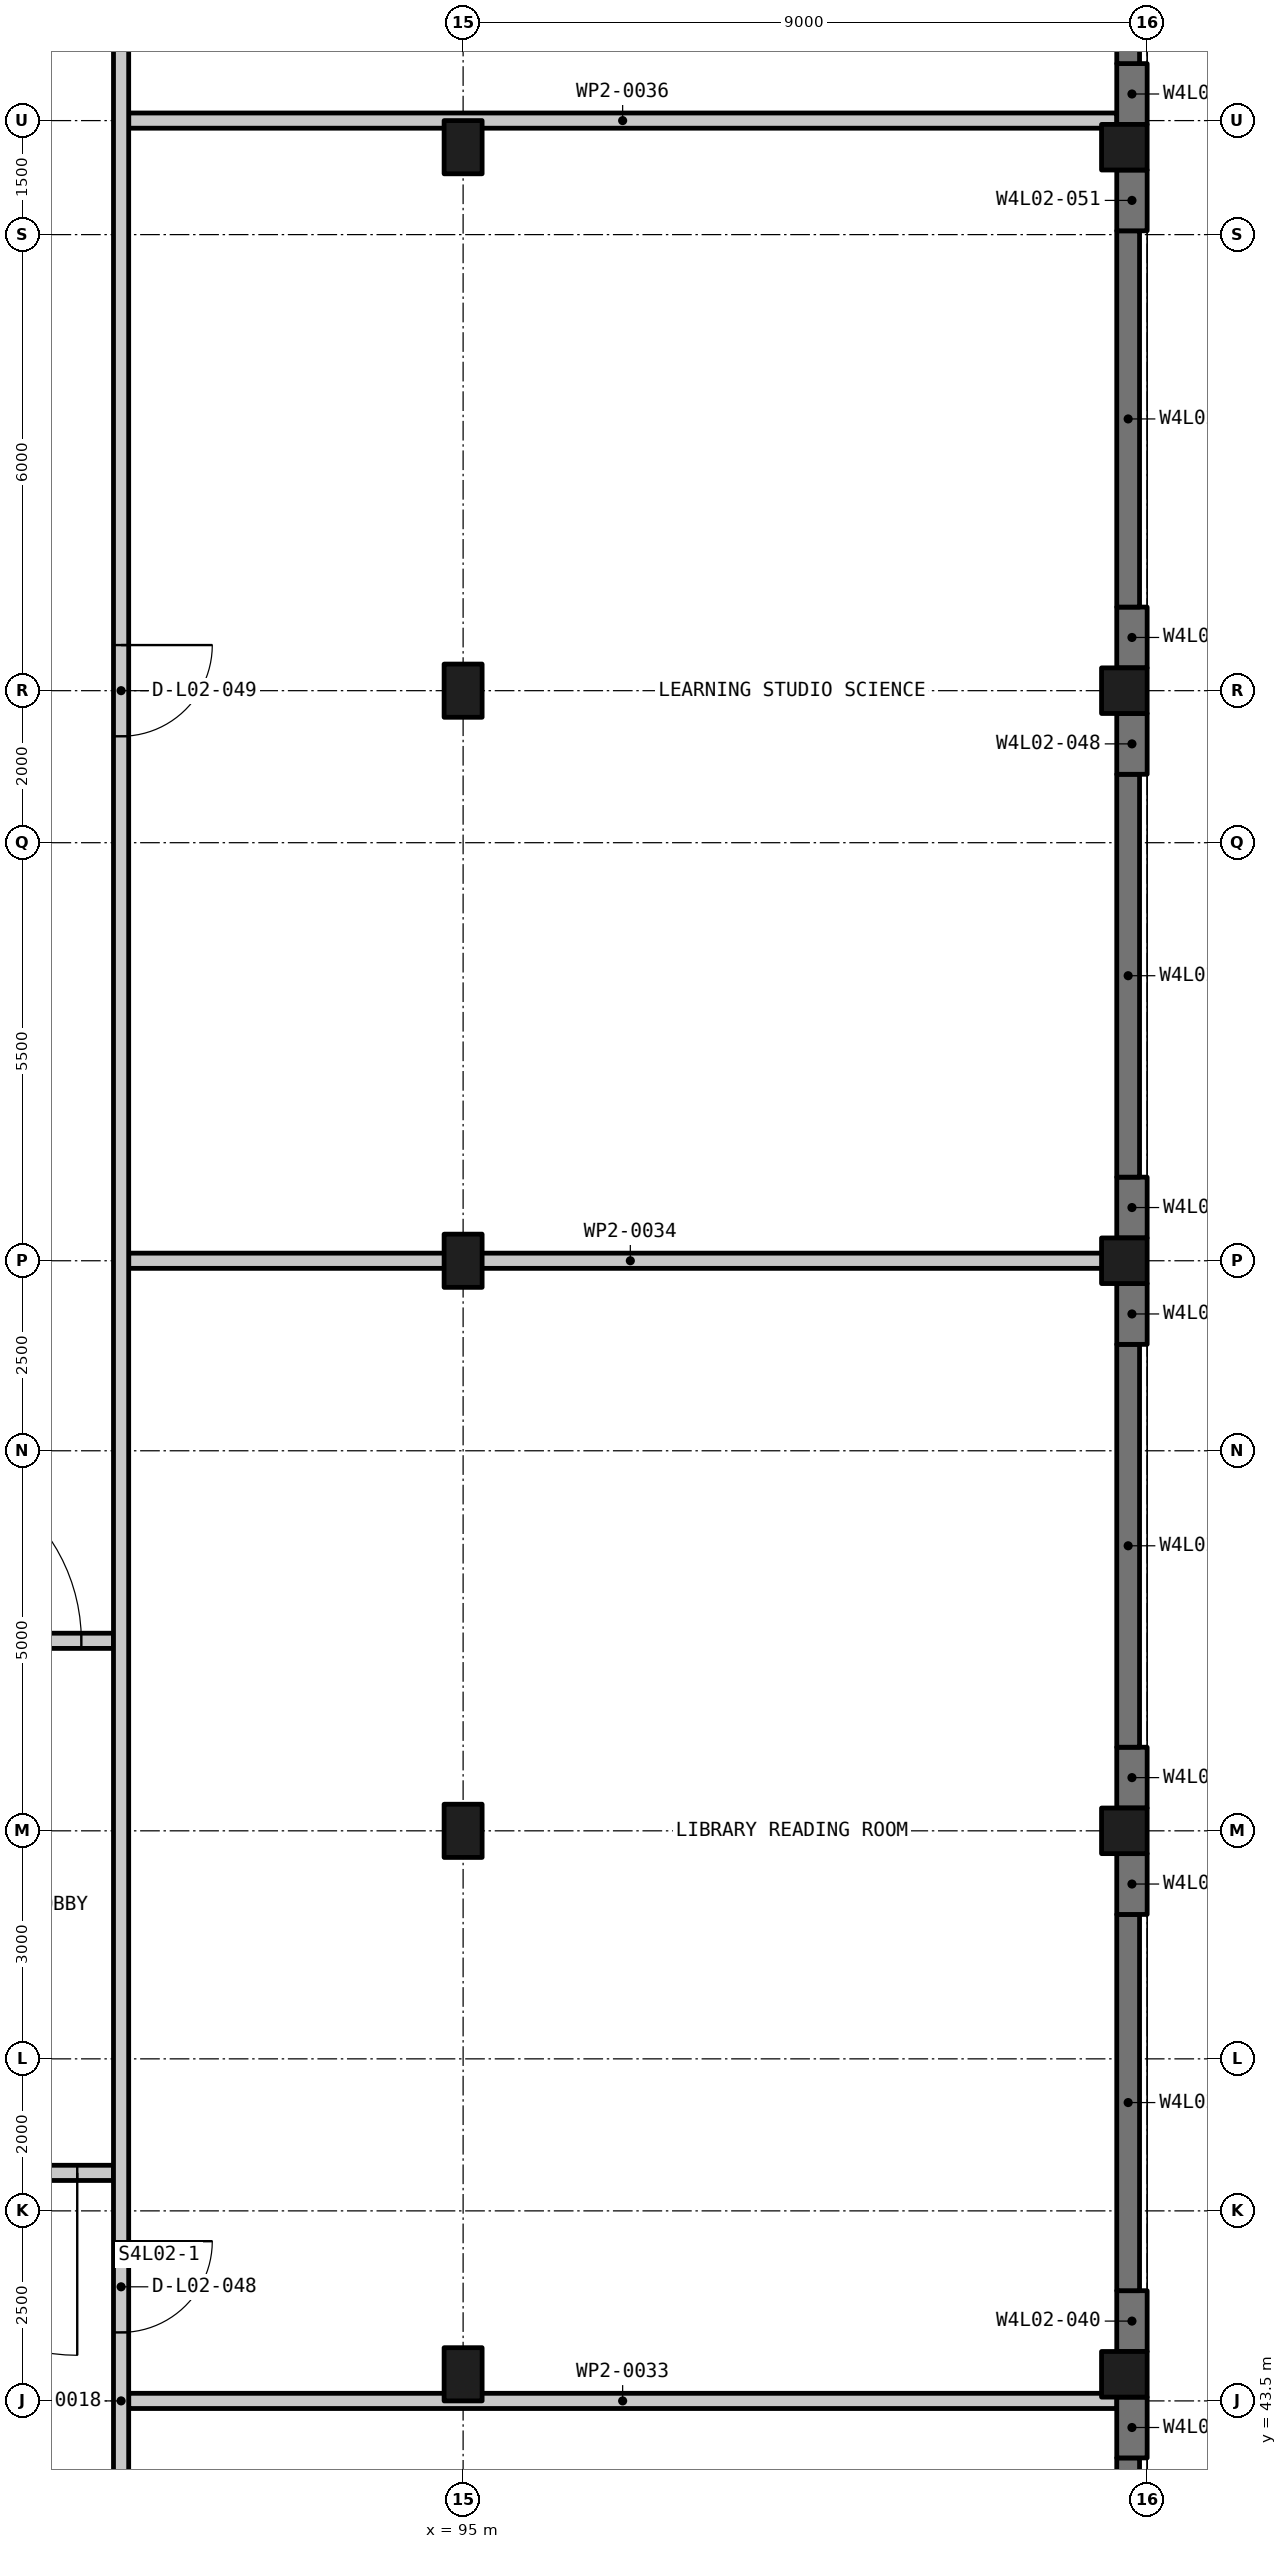
"""IFC4 building model, lengths in metres.
Left out: names, types, materials, properties, quantities, classifications, styles, units other than length and angle.
Written with IfcOpenShell. Run it as: python <this file> out.ifc"""

import sys

from ifc_helpers import new_model, si_unit, direction, frame, frame_2d, origin, origin_2d, place, context, subcontext, project, spatial, rectangle, extrude, element, fill, save


model = new_model("IFC4")
c1 = context("Model", 3, precision=1e-05, world=origin(), true_north=direction((0.0, 1.0)))
c2 = subcontext(c1, "Body", "Model", "MODEL_VIEW")
j1 = project(units=[si_unit("LENGTHUNIT", "METRE"), si_unit("PLANEANGLEUNIT", "RADIAN")], contexts=[c1])
p1 = place(None, origin())
s1 = spatial("IfcSite", under=j1, at=p1, CompositionType="ELEMENT")
p2 = place(p1, origin())
s2 = spatial("IfcBuilding", under=s1, at=p2, CompositionType="ELEMENT")
p3 = place(p2, frame((0.0, 0.0, 11.25)))
s3 = spatial("IfcBuildingStorey", under=s2, at=p3, CompositionType="ELEMENT", Elevation=11.25)
for number, where, z_axis, x_axis in (
    (1, (95.0, 43.85, -0.3), (0.0, 0.0, 1.0), (1.0, 0.0, 0.0)),
    (2, (95.0, 51.0, -0.3), (0.0, 0.0, 1.0), (1.0, 0.0, 0.0)),
    (3, (95.0, 58.5, -0.3), (0.0, 0.0, 1.0), (1.0, 0.0, 0.0)),
    (4, (95.0, 66.0, -0.3), (0.0, 0.0, 1.0), (1.0, 0.0, 0.0)),
    (5, (95.0, 73.15, -0.3), (0.0, 0.0, 1.0), (1.0, 0.0, 0.0)),
):
    element("IfcColumn", number, at=place(p3, frame(where, z_axis=z_axis, x_axis=x_axis)), inside=s3, PredefinedType="COLUMN", context=c2, shape_type="SweptSolid", body=[
        extrude(rectangle(XDim=0.5, YDim=0.7, at=origin_2d()), origin(), (0.0, 0.0, 1.0), 4.5),
    ])
for number, where, z_axis, x_axis in (
    (6, (103.7, 43.85, -0.3), (0.0, 0.0, 1.0), (1.0, 0.0, 0.0)),
    (7, (103.7, 51.0, -0.3), (0.0, 0.0, 1.0), (1.0, 0.0, 0.0)),
    (8, (103.7, 58.5, -0.3), (0.0, 0.0, 1.0), (1.0, 0.0, 0.0)),
    (9, (103.7, 66.0, -0.3), (0.0, 0.0, 1.0), (1.0, 0.0, 0.0)),
    (10, (103.7, 73.15, -0.3), (0.0, 0.0, 1.0), (1.0, 0.0, 0.0)),
):
    element("IfcColumn", number, at=place(p3, frame(where, z_axis=z_axis, x_axis=x_axis)), inside=s3, PredefinedType="COLUMN", context=c2, shape_type="SweptSolid", body=[
        extrude(rectangle(XDim=0.6, YDim=0.6, at=origin_2d()), origin(), (0.0, 0.0, 1.0), 4.5),
    ])
p4 = place(p3, frame((103.75, 37.1, -0.3), z_axis=(0.0, 0.0, 1.0), x_axis=(0.0, 1.0, 0.0)))
e11 = element("IfcWall", 11, at=p4, inside=s3, PredefinedType="SOLIDWALL", context=c2, shape_type="SweptSolid", body=[
    extrude(rectangle(XDim=5.65, YDim=0.3, at=frame_2d((2.825, 0.0))), origin(), (0.0, 0.0, 1.0), 4.5),
])
for number, where, z_axis, x_axis in (
    (12, (103.8, 42.75, -0.3), (0.0, 0.0, 1.0), (0.0, 1.0, 0.0)),
    (13, (103.8, 44.15, -0.3), (0.0, 0.0, 1.0), (0.0, 1.0, 0.0)),
):
    element("IfcWall", number, at=place(p3, frame(where, z_axis=z_axis, x_axis=x_axis)), inside=s3, PredefinedType="SOLIDWALL", context=c2, shape_type="SweptSolid", body=[
        extrude(rectangle(XDim=0.8, YDim=0.4, at=frame_2d((0.4, 0.0))), origin(), (0.0, 0.0, 1.0), 4.5),
    ])
p5 = place(p3, frame((103.75, 44.95, -0.3), z_axis=(0.0, 0.0, 1.0), x_axis=(0.0, 1.0, 0.0)))
e14 = element("IfcWall", 14, at=p5, inside=s3, PredefinedType="SOLIDWALL", context=c2, shape_type="SweptSolid", body=[
    extrude(rectangle(XDim=4.95, YDim=0.3, at=frame_2d((2.475, 0.0))), origin(), (0.0, 0.0, 1.0), 4.5),
])
for number, where, z_axis, x_axis in (
    (15, (103.8, 49.9, -0.3), (0.0, 0.0, 1.0), (0.0, 1.0, 0.0)),
    (16, (103.8, 51.3, -0.3), (0.0, 0.0, 1.0), (0.0, 1.0, 0.0)),
):
    element("IfcWall", number, at=place(p3, frame(where, z_axis=z_axis, x_axis=x_axis)), inside=s3, PredefinedType="SOLIDWALL", context=c2, shape_type="SweptSolid", body=[
        extrude(rectangle(XDim=0.8, YDim=0.4, at=frame_2d((0.4, 0.0))), origin(), (0.0, 0.0, 1.0), 4.5),
    ])
p6 = place(p3, frame((103.75, 52.1, -0.3), z_axis=(0.0, 0.0, 1.0), x_axis=(0.0, 1.0, 0.0)))
e17 = element("IfcWall", 17, at=p6, inside=s3, PredefinedType="SOLIDWALL", context=c2, shape_type="SweptSolid", body=[
    extrude(rectangle(XDim=5.3, YDim=0.3, at=frame_2d((2.65, 0.0))), origin(), (0.0, 0.0, 1.0), 4.5),
])
for number, where, z_axis, x_axis in (
    (18, (103.8, 57.4, -0.3), (0.0, 0.0, 1.0), (0.0, 1.0, 0.0)),
    (19, (103.8, 58.8, -0.3), (0.0, 0.0, 1.0), (0.0, 1.0, 0.0)),
):
    element("IfcWall", number, at=place(p3, frame(where, z_axis=z_axis, x_axis=x_axis)), inside=s3, PredefinedType="SOLIDWALL", context=c2, shape_type="SweptSolid", body=[
        extrude(rectangle(XDim=0.8, YDim=0.4, at=frame_2d((0.4, 0.0))), origin(), (0.0, 0.0, 1.0), 4.5),
    ])
p7 = place(p3, frame((103.75, 59.6, -0.3), z_axis=(0.0, 0.0, 1.0), x_axis=(0.0, 1.0, 0.0)))
e20 = element("IfcWall", 20, at=p7, inside=s3, PredefinedType="SOLIDWALL", context=c2, shape_type="SweptSolid", body=[
    extrude(rectangle(XDim=5.3, YDim=0.3, at=frame_2d((2.65, 0.0))), origin(), (0.0, 0.0, 1.0), 4.5),
])
for number, where, z_axis, x_axis in (
    (21, (103.8, 64.9, -0.3), (0.0, 0.0, 1.0), (0.0, 1.0, 0.0)),
    (22, (103.8, 66.3, -0.3), (0.0, 0.0, 1.0), (0.0, 1.0, 0.0)),
):
    element("IfcWall", number, at=place(p3, frame(where, z_axis=z_axis, x_axis=x_axis)), inside=s3, PredefinedType="SOLIDWALL", context=c2, shape_type="SweptSolid", body=[
        extrude(rectangle(XDim=0.8, YDim=0.4, at=frame_2d((0.4, 0.0))), origin(), (0.0, 0.0, 1.0), 4.5),
    ])
p8 = place(p3, frame((103.75, 67.1, -0.3), z_axis=(0.0, 0.0, 1.0), x_axis=(0.0, 1.0, 0.0)))
e23 = element("IfcWall", 23, at=p8, inside=s3, PredefinedType="SOLIDWALL", context=c2, shape_type="SweptSolid", body=[
    extrude(rectangle(XDim=4.95, YDim=0.3, at=frame_2d((2.475, 0.0))), origin(), (0.0, 0.0, 1.0), 4.5),
])
for number, where, z_axis, x_axis in (
    (24, (103.8, 72.05, -0.3), (0.0, 0.0, 1.0), (0.0, 1.0, 0.0)),
    (25, (103.8, 73.45, -0.3), (0.0, 0.0, 1.0), (0.0, 1.0, 0.0)),
):
    element("IfcWall", number, at=place(p3, frame(where, z_axis=z_axis, x_axis=x_axis)), inside=s3, PredefinedType="SOLIDWALL", context=c2, shape_type="SweptSolid", body=[
        extrude(rectangle(XDim=0.8, YDim=0.4, at=frame_2d((0.4, 0.0))), origin(), (0.0, 0.0, 1.0), 4.5),
    ])
p9 = place(p3, frame((103.75, 74.25, -0.3), z_axis=(0.0, 0.0, 1.0), x_axis=(0.0, 1.0, 0.0)))
e26 = element("IfcWall", 26, at=p9, inside=s3, PredefinedType="SOLIDWALL", context=c2, shape_type="SweptSolid", body=[
    extrude(rectangle(XDim=5.3, YDim=0.3, at=frame_2d((2.65, 0.0))), origin(), (0.0, 0.0, 1.0), 4.5),
])
p10 = place(p3, frame((90.6, 43.5, 0.0), z_axis=(0.0, 0.0, 1.0), x_axis=(1.0, 0.0, 0.0)))
e27 = element("IfcWall", 27, at=p10, inside=s3, PredefinedType="PARTITIONING", context=c2, shape_type="SweptSolid", body=[
    extrude(rectangle(XDim=12.998, YDim=0.2, at=frame_2d((6.499, 0.0))), origin(), (0.0, 0.0, 1.0), 3.4),
])
p11 = place(p3, frame((90.4, 46.5, 0.0), z_axis=(0.0, 0.0, 1.0), x_axis=(-1.0, 0.0, 0.0)))
e28 = element("IfcWall", 28, at=p11, inside=s3, PredefinedType="PARTITIONING", context=c2, shape_type="SweptSolid", body=[
    extrude(rectangle(XDim=3.3, YDim=0.2, at=frame_2d((1.65, 0.0))), origin(), (0.0, 0.0, 1.0), 3.4),
])
p12 = place(p11, frame((0.477, 0.0, 0.0)))
e29 = element("IfcOpeningElement", 29, at=p12, cuts=e28, PredefinedType="OPENING", context=c2, shape_type="SweptSolid", body=[
    extrude(rectangle(XDim=2.4, YDim=2.1, at=frame_2d((1.2, 1.05))), frame((0.0, 0.11, 0.0), z_axis=(0.0, -1.0, 0.0), x_axis=(1.0, 0.0, 0.0)), (0.0, 0.0, 1.0), 0.22),
])
p13 = place(p3, frame((87.1, 53.5, 0.0), z_axis=(0.0, 0.0, 1.0), x_axis=(1.0, 0.0, 0.0)))
e30 = element("IfcWall", 30, at=p13, inside=s3, PredefinedType="PARTITIONING", context=c2, shape_type="SweptSolid", body=[
    extrude(rectangle(XDim=3.3, YDim=0.2, at=frame_2d((1.65, 0.0))), origin(), (0.0, 0.0, 1.0), 3.4),
])
p14 = place(p13, frame((0.477, 0.0, 0.0)))
e31 = element("IfcOpeningElement", 31, at=p14, cuts=e30, PredefinedType="OPENING", context=c2, shape_type="SweptSolid", body=[
    extrude(rectangle(XDim=2.4, YDim=2.1, at=frame_2d((1.2, 1.05))), frame((0.0, 0.11, 0.0), z_axis=(0.0, -1.0, 0.0), x_axis=(1.0, 0.0, 0.0)), (0.0, 0.0, 1.0), 0.22),
])
p15 = place(p3, frame((90.6, 58.5, 0.0), z_axis=(0.0, 0.0, 1.0), x_axis=(1.0, 0.0, 0.0)))
e32 = element("IfcWall", 32, at=p15, inside=s3, PredefinedType="PARTITIONING", context=c2, shape_type="SweptSolid", body=[
    extrude(rectangle(XDim=13.2, YDim=0.2, at=frame_2d((6.6, 0.0))), origin(), (0.0, 0.0, 1.0), 3.3),
])
p16 = place(p3, frame((90.6, 73.5, 0.0), z_axis=(0.0, 0.0, 1.0), x_axis=(1.0, 0.0, 0.0)))
e33 = element("IfcWall", 33, at=p16, inside=s3, PredefinedType="PARTITIONING", context=c2, shape_type="SweptSolid", body=[
    extrude(rectangle(XDim=12.998, YDim=0.2, at=frame_2d((6.499, 0.0))), origin(), (0.0, 0.0, 1.0), 3.4),
])
p17 = place(p3, frame((90.5, 80.8, 0.0), z_axis=(0.0, 0.0, 1.0), x_axis=(0.0, -1.0, 0.0)))
e34 = element("IfcWall", 34, at=p17, inside=s3, PredefinedType="PARTITIONING", context=c2, shape_type="SweptSolid", body=[
    extrude(rectangle(XDim=74.6, YDim=0.2, at=frame_2d((37.3, 0.0))), origin(), (0.0, 0.0, 1.0), 3.3),
])
p18 = place(p17, frame((66.6, 0.0, 0.0)))
e35 = element("IfcOpeningElement", 35, at=p18, cuts=e34, PredefinedType="OPENING", context=c2, shape_type="SweptSolid", body=[
    extrude(rectangle(XDim=1.2, YDim=2.1, at=frame_2d((0.6, 1.05))), frame((0.0, 0.11, 0.0), z_axis=(0.0, -1.0, 0.0), x_axis=(1.0, 0.0, 0.0)), (0.0, 0.0, 1.0), 0.22),
])
p19 = place(p17, frame((55.45, 0.0, 0.0)))
e36 = element("IfcOpeningElement", 36, at=p19, cuts=e34, PredefinedType="OPENING", context=c2, shape_type="SweptSolid", body=[
    extrude(rectangle(XDim=1.2, YDim=2.1, at=frame_2d((0.6, 1.05))), frame((0.0, 0.11, 0.0), z_axis=(0.0, -1.0, 0.0), x_axis=(1.0, 0.0, 0.0)), (0.0, 0.0, 1.0), 0.22),
])
p20 = place(p17, frame((44.2, 0.0, 0.0)))
e37 = element("IfcOpeningElement", 37, at=p20, cuts=e34, PredefinedType="OPENING", context=c2, shape_type="SweptSolid", body=[
    extrude(rectangle(XDim=1.2, YDim=2.1, at=frame_2d((0.6, 1.05))), frame((0.0, 0.11, 0.0), z_axis=(0.0, -1.0, 0.0), x_axis=(1.0, 0.0, 0.0)), (0.0, 0.0, 1.0), 0.22),
])
p21 = place(p17, frame((35.199, 0.0, 0.0)))
e38 = element("IfcOpeningElement", 38, at=p21, cuts=e34, PredefinedType="OPENING", context=c2, shape_type="SweptSolid", body=[
    extrude(rectangle(XDim=1.2, YDim=2.1, at=frame_2d((0.6, 1.05))), frame((0.0, 0.11, 0.0), z_axis=(0.0, -1.0, 0.0), x_axis=(1.0, 0.0, 0.0)), (0.0, 0.0, 1.0), 0.22),
])
p22 = place(p17, frame((14.2, 0.0, 0.0)))
e39 = element("IfcOpeningElement", 39, at=p22, cuts=e34, PredefinedType="OPENING", context=c2, shape_type="SweptSolid", body=[
    extrude(rectangle(XDim=1.2, YDim=2.1, at=frame_2d((0.6, 1.05))), frame((0.0, 0.11, 0.0), z_axis=(0.0, -1.0, 0.0), x_axis=(1.0, 0.0, 0.0)), (0.0, 0.0, 1.0), 0.22),
])
p23 = place(p17, frame((3.075, 0.0, 0.0)))
e40 = element("IfcOpeningElement", 40, at=p23, cuts=e34, PredefinedType="OPENING", context=c2, shape_type="SweptSolid", body=[
    extrude(rectangle(XDim=1.2, YDim=2.1, at=frame_2d((0.6, 1.05))), frame((0.0, 0.11, 0.0), z_axis=(0.0, -1.0, 0.0), x_axis=(1.0, 0.0, 0.0)), (0.0, 0.0, 1.0), 0.22),
])
p24 = place(p14, origin())
e41 = element("IfcDoor", 41, at=p24, inside=s3, OperationType="DOUBLE_DOOR_SINGLE_SWING", PredefinedType="DOOR", context=c2, shape_type="SweptSolid", body=[
    extrude(rectangle(XDim=2.4, YDim=2.1, at=frame_2d((1.2, 1.05))), frame((0.0, 0.025, 0.0), z_axis=(0.0, -1.0, 0.0), x_axis=(1.0, 0.0, 0.0)), (0.0, 0.0, 1.0), 0.05),
])
fill(e31, e41)
p25 = place(p12, origin())
e42 = element("IfcDoor", 42, at=p25, inside=s3, OperationType="DOUBLE_DOOR_SINGLE_SWING", PredefinedType="DOOR", context=c2, shape_type="SweptSolid", body=[
    extrude(rectangle(XDim=2.4, YDim=2.1, at=frame_2d((1.2, 1.05))), frame((0.0, 0.025, 0.0), z_axis=(0.0, -1.0, 0.0), x_axis=(1.0, 0.0, 0.0)), (0.0, 0.0, 1.0), 0.05),
])
fill(e29, e42)
p26 = place(p21, origin())
e43 = element("IfcDoor", 43, at=p26, inside=s3, OperationType="SINGLE_SWING_RIGHT", PredefinedType="DOOR", context=c2, shape_type="SweptSolid", body=[
    extrude(rectangle(XDim=1.2, YDim=2.1, at=frame_2d((0.6, 1.05))), frame((0.0, 0.025, 0.0), z_axis=(0.0, -1.0, 0.0), x_axis=(1.0, 0.0, 0.0)), (0.0, 0.0, 1.0), 0.05),
])
fill(e38, e43)
p27 = place(p22, origin())
e44 = element("IfcDoor", 44, at=p27, inside=s3, OperationType="SINGLE_SWING_RIGHT", PredefinedType="DOOR", context=c2, shape_type="SweptSolid", body=[
    extrude(rectangle(XDim=1.2, YDim=2.1, at=frame_2d((0.6, 1.05))), frame((0.0, 0.025, 0.0), z_axis=(0.0, -1.0, 0.0), x_axis=(1.0, 0.0, 0.0)), (0.0, 0.0, 1.0), 0.05),
])
fill(e39, e44)
save(model, sys.argv[1])
